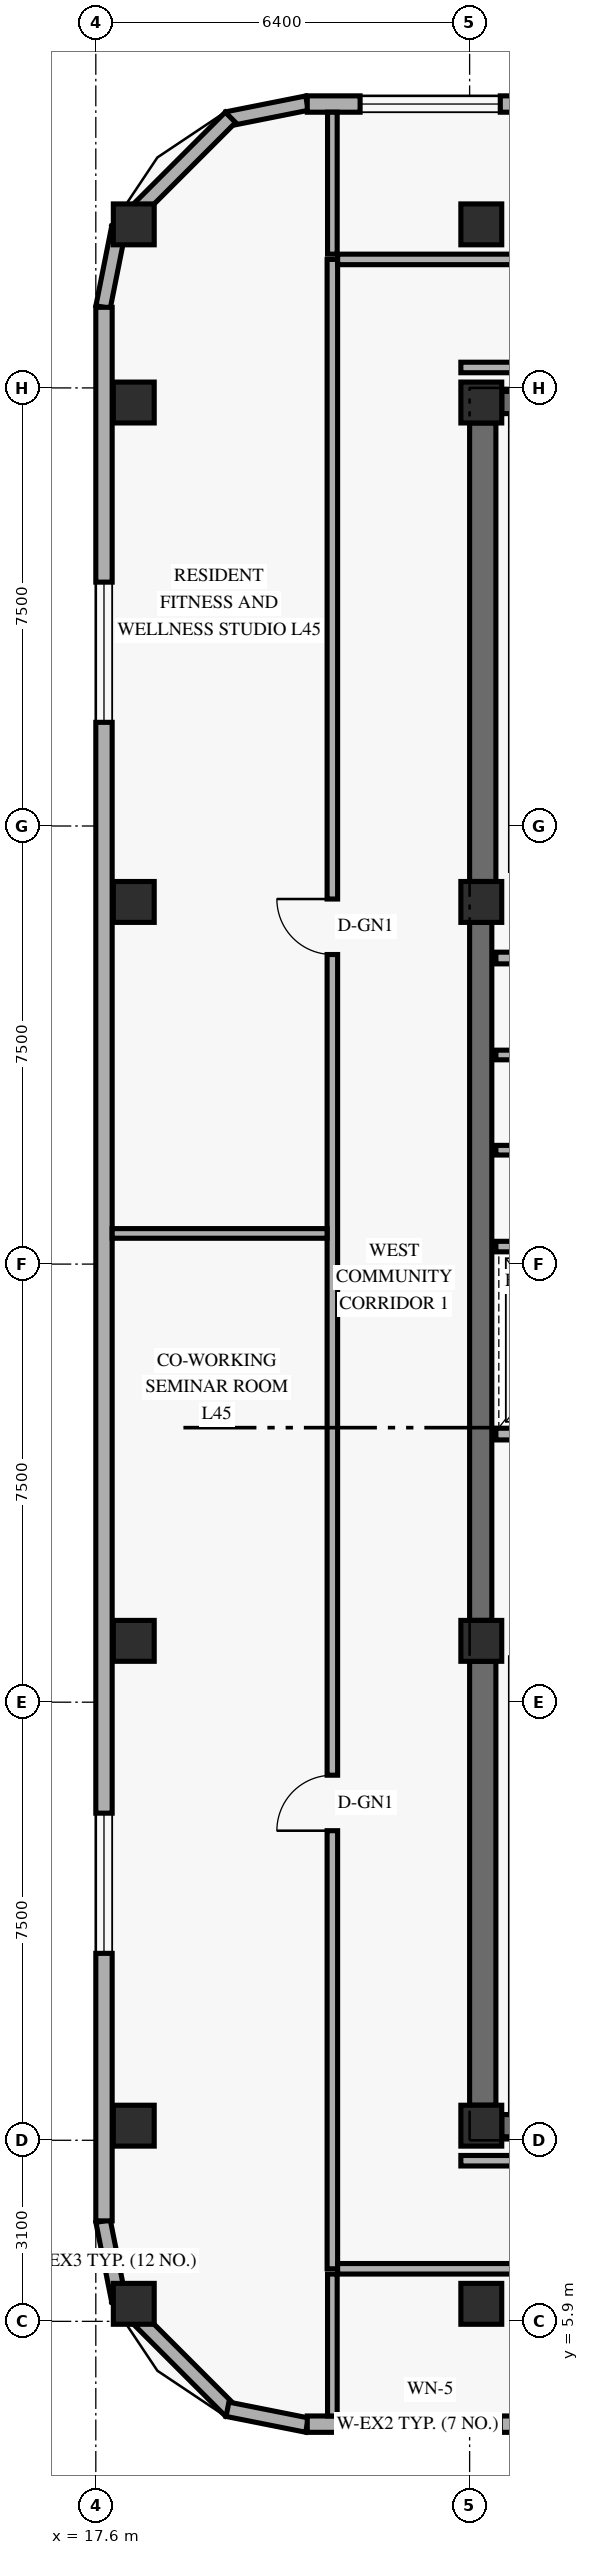
"""IFC4 building model, lengths in metres.
Left out: names, types, materials, properties, quantities, classifications, styles, units other than length and angle.
Written with IfcOpenShell. Run it as: python <this file> out.ifc"""

import sys

from ifc_helpers import new_model, si_unit, direction, frame, frame_2d, origin, origin_2d, place, context, subcontext, project, spatial, rectangle, extrude, element, fill, save


model = new_model("IFC4")
c1 = context("Model", 3, precision=1e-05, world=origin(), true_north=direction((0.0, 1.0)))
c2 = subcontext(c1, "Body", "Model", "MODEL_VIEW")
j1 = project(units=[si_unit("LENGTHUNIT", "METRE"), si_unit("PLANEANGLEUNIT", "RADIAN")], contexts=[c1])
p1 = place(None, origin())
s1 = spatial("IfcSite", under=j1, at=p1, CompositionType="ELEMENT")
p2 = place(p1, origin())
s2 = spatial("IfcBuilding", under=s1, at=p2, CompositionType="ELEMENT")
p3 = place(p2, frame((0.0, 0.0, 173.4)))
s3 = spatial("IfcBuildingStorey", under=s2, at=p3, CompositionType="ELEMENT", Elevation=173.4)
p4 = place(p3, frame((24.225, 9.6, 0.0), z_axis=(0.0, 0.0, 1.0), x_axis=(0.0, 1.0, 0.0)))
e1 = element("IfcWall", 1, at=p4, inside=s3, PredefinedType="SHEAR", context=c2, shape_type="SweptSolid", body=[
    extrude(rectangle(XDim=7.6, YDim=0.45, at=frame_2d((3.8, 0.0))), origin(), (0.0, 0.0, 1.0), 3.348),
])
p5 = place(p3, frame((24.19, 17.9, 0.0), z_axis=(0.0, 0.0, 1.0), x_axis=(0.0, 1.0, 0.0)))
e2 = element("IfcWall", 2, at=p5, inside=s3, PredefinedType="SHEAR", context=c2, shape_type="SweptSolid", body=[
    extrude(rectangle(XDim=11.95, YDim=0.38, at=frame_2d((5.975, 0.0))), origin(), (0.0, 0.0, 1.0), 3.348),
])
p6 = place(p3, frame((24.225, 30.55, 0.0), z_axis=(0.0, 0.0, 1.0), x_axis=(0.0, 1.0, 0.0)))
e3 = element("IfcWall", 3, at=p6, inside=s3, PredefinedType="SHEAR", context=c2, shape_type="SweptSolid", body=[
    extrude(rectangle(XDim=7.85, YDim=0.45, at=frame_2d((3.925, 0.0))), origin(), (0.0, 0.0, 1.0), 3.348),
])
for number, where, z_axis, x_axis in (
    (4, (24.55, 9.25, 0.0), (0.0, 0.0, 1.0), (1.0, 0.0, 0.0)),
    (5, (24.55, 38.75, 0.0), (0.0, 0.0, 1.0), (1.0, 0.0, 0.0)),
):
    element("IfcWall", number, at=place(p3, frame(where, z_axis=z_axis, x_axis=x_axis)), inside=s3, PredefinedType="SHEAR", context=c2, shape_type="SweptSolid", body=[
        extrude(rectangle(XDim=10.3, YDim=0.38, at=frame_2d((5.15, 0.0))), origin(), (0.0, 0.0, 1.0), 3.96),
    ])
for number, where, z_axis, x_axis in (
    (6, (18.25, 6.2, 0.0), (0.0, 0.0, 1.0), (1.0, 0.0, 0.0)),
    (7, (18.25, 9.25, 0.0), (0.0, 0.0, 1.0), (1.0, 0.0, 0.0)),
    (8, (18.25, 17.55, 0.0), (0.0, 0.0, 1.0), (1.0, 0.0, 0.0)),
    (9, (18.25, 30.2, 0.0), (0.0, 0.0, 1.0), (1.0, 0.0, 0.0)),
    (10, (18.25, 38.75, 0.0), (0.0, 0.0, 1.0), (1.0, 0.0, 0.0)),
    (11, (18.25, 41.8, 0.0), (0.0, 0.0, 1.0), (1.0, 0.0, 0.0)),
    (12, (24.2, 6.2, 0.0), (0.0, 0.0, 1.0), (1.0, 0.0, 0.0)),
    (13, (24.2, 9.25, 0.0), (0.0, 0.0, 1.0), (1.0, 0.0, 0.0)),
    (14, (24.2, 17.55, 0.0), (0.0, 0.0, 1.0), (1.0, 0.0, 0.0)),
    (15, (24.2, 30.2, 0.0), (0.0, 0.0, 1.0), (1.0, 0.0, 0.0)),
    (16, (24.2, 38.75, 0.0), (0.0, 0.0, 1.0), (1.0, 0.0, 0.0)),
    (17, (24.2, 41.8, 0.0), (0.0, 0.0, 1.0), (1.0, 0.0, 0.0)),
):
    element("IfcColumn", number, at=place(p3, frame(where, z_axis=z_axis, x_axis=x_axis)), inside=s3, PredefinedType="COLUMN", context=c2, shape_type="SweptSolid", body=[
        extrude(rectangle(XDim=0.7, YDim=0.7, at=origin_2d()), origin(), (0.0, 0.0, 1.0), 4.2),
    ])
p7 = place(p3, frame((17.724, 7.616, 0.0), z_axis=(0.0, 0.0, 1.0), x_axis=(0.195135625965, -0.9807762678, 0.0)))
e18 = element("IfcWall", 18, at=p7, inside=s3, PredefinedType="SOLIDWALL", context=c2, shape_type="SweptSolid", body=[
    extrude(rectangle(XDim=1.389, YDim=0.25, at=frame_2d((0.694, 0.0))), origin(), (0.0, 0.0, 1.0), 3.96),
])
p8 = place(p3, frame((17.968, 6.305, 0.0), z_axis=(0.0, 0.0, 1.0), x_axis=(0.707106781187, -0.707106781187, 0.0)))
e19 = element("IfcWall", 19, at=p8, inside=s3, PredefinedType="SOLIDWALL", context=c2, shape_type="SweptSolid", body=[
    extrude(rectangle(XDim=2.739, YDim=0.25, at=frame_2d((1.37, 0.0))), origin(), (0.0, 0.0, 1.0), 3.96),
])
for number, where, z_axis, x_axis in (
    (20, (19.854, 4.395, 0.0), (0.0, 0.0, 1.0), (0.981, -0.195, 0.0)),
    (21, (21.217, 43.876, 0.0), (0.0, 0.0, 1.0), (-0.981, -0.195, 0.0)),
):
    element("IfcWall", number, at=place(p3, frame(where, z_axis=z_axis, x_axis=x_axis)), inside=s3, PredefinedType="SOLIDWALL", context=c2, shape_type="SweptSolid", body=[
        extrude(rectangle(XDim=1.389, YDim=0.25, at=frame_2d((0.694, 0.0))), origin(), (0.0, 0.0, 1.0), 3.96),
    ])
p9 = place(p3, frame((19.905, 43.632, 0.0), z_axis=(0.0, 0.0, 1.0), x_axis=(-0.707106781187, -0.707106781187, 0.0)))
e22 = element("IfcWall", 22, at=p9, inside=s3, PredefinedType="SOLIDWALL", context=c2, shape_type="SweptSolid", body=[
    extrude(rectangle(XDim=2.739, YDim=0.25, at=frame_2d((1.37, 0.0))), origin(), (0.0, 0.0, 1.0), 3.96),
])
p10 = place(p3, frame((17.995, 41.746, 0.0), z_axis=(0.0, 0.0, 1.0), x_axis=(-0.195135625965, -0.9807762678, 0.0)))
e23 = element("IfcWall", 23, at=p10, inside=s3, PredefinedType="SOLIDWALL", context=c2, shape_type="SweptSolid", body=[
    extrude(rectangle(XDim=1.389, YDim=0.25, at=frame_2d((0.694, 0.0))), origin(), (0.0, 0.0, 1.0), 3.96),
])
p11 = place(p3, frame((21.22, 4.14, 0.0), z_axis=(0.0, 0.0, 1.0), x_axis=(1.0, 0.0, 0.0)))
e24 = element("IfcWall", 24, at=p11, inside=s3, PredefinedType="SOLIDWALL", context=c2, shape_type="SweptSolid", body=[
    extrude(rectangle(XDim=3.78, YDim=0.28, at=frame_2d((1.89, 0.0))), origin(), (0.0, 0.0, 1.0), 3.96),
])
p12 = place(p11, frame((0.905, 0.0, 0.85)))
e25 = element("IfcOpeningElement", 25, at=p12, cuts=e24, PredefinedType="OPENING", context=c2, shape_type="SweptSolid", body=[
    extrude(rectangle(XDim=2.4, YDim=1.9, at=frame_2d((1.2, 0.95))), frame((0.0, 0.15, 0.0), z_axis=(0.0, -1.0, 0.0), x_axis=(1.0, 0.0, 0.0)), (0.0, 0.0, 1.0), 0.3),
])
p13 = place(p3, frame((25.0, 43.86, 0.0), z_axis=(0.0, 0.0, 1.0), x_axis=(-1.0, 0.0, 0.0)))
e26 = element("IfcWall", 26, at=p13, inside=s3, PredefinedType="SOLIDWALL", context=c2, shape_type="SweptSolid", body=[
    extrude(rectangle(XDim=3.78, YDim=0.28, at=frame_2d((1.89, 0.0))), origin(), (0.0, 0.0, 1.0), 3.96),
])
p14 = place(p13, frame((0.475, 0.0, 0.85)))
e27 = element("IfcOpeningElement", 27, at=p14, cuts=e26, PredefinedType="OPENING", context=c2, shape_type="SweptSolid", body=[
    extrude(rectangle(XDim=2.4, YDim=1.9, at=frame_2d((1.2, 0.95))), frame((0.0, 0.15, 0.0), z_axis=(0.0, -1.0, 0.0), x_axis=(1.0, 0.0, 0.0)), (0.0, 0.0, 1.0), 0.3),
])
p15 = place(p3, frame((17.74, 40.38, 0.0), z_axis=(0.0, 0.0, 1.0), x_axis=(0.0, -1.0, 0.0)))
e28 = element("IfcWall", 28, at=p15, inside=s3, PredefinedType="SOLIDWALL", context=c2, shape_type="SweptSolid", body=[
    extrude(rectangle(XDim=32.76, YDim=0.28, at=frame_2d((16.38, 0.0))), origin(), (0.0, 0.0, 1.0), 3.96),
])
p16 = place(p15, frame((25.78, 0.0, 0.85)))
e29 = element("IfcOpeningElement", 29, at=p16, cuts=e28, PredefinedType="OPENING", context=c2, shape_type="SweptSolid", body=[
    extrude(rectangle(XDim=2.4, YDim=1.9, at=frame_2d((1.2, 0.95))), frame((0.0, 0.15, 0.0), z_axis=(0.0, -1.0, 0.0), x_axis=(1.0, 0.0, 0.0)), (0.0, 0.0, 1.0), 0.3),
])
p17 = place(p15, frame((4.705, 0.0, 0.85)))
e30 = element("IfcOpeningElement", 30, at=p17, cuts=e28, PredefinedType="OPENING", context=c2, shape_type="SweptSolid", body=[
    extrude(rectangle(XDim=2.4, YDim=1.9, at=frame_2d((1.2, 0.95))), frame((0.0, 0.15, 0.0), z_axis=(0.0, -1.0, 0.0), x_axis=(1.0, 0.0, 0.0)), (0.0, 0.0, 1.0), 0.3),
])
p18 = place(p3, frame((24.45, 21.09, 0.0), z_axis=(0.0, 0.0, 1.0), x_axis=(1.0, 0.0, 0.0)))
e31 = element("IfcWall", 31, at=p18, inside=s3, PredefinedType="STANDARD", context=c2, shape_type="SweptSolid", body=[
    extrude(rectangle(XDim=6.83, YDim=0.2, at=frame_2d((3.415, 0.0))), origin(), (0.0, 0.0, 1.0), 3.96),
])
p19 = place(p18, frame((0.72, 0.0, 0.0)))
e32 = element("IfcOpeningElement", 32, at=p19, cuts=e31, PredefinedType="OPENING", context=c2, shape_type="SweptSolid", body=[
    extrude(rectangle(XDim=1.1, YDim=2.2, at=frame_2d((0.55, 1.1))), frame((0.0, 0.11, 0.0), z_axis=(0.0, -1.0, 0.0), x_axis=(1.0, 0.0, 0.0)), (0.0, 0.0, 1.0), 0.22),
])
p20 = place(p18, frame((3.32, 0.0, 0.0)))
e33 = element("IfcOpeningElement", 33, at=p20, cuts=e31, PredefinedType="OPENING", context=c2, shape_type="SweptSolid", body=[
    extrude(rectangle(XDim=1.1, YDim=2.2, at=frame_2d((0.55, 1.1))), frame((0.0, 0.11, 0.0), z_axis=(0.0, -1.0, 0.0), x_axis=(1.0, 0.0, 0.0)), (0.0, 0.0, 1.0), 0.22),
])
p21 = place(p3, frame((24.45, 24.3, 0.0), z_axis=(0.0, 0.0, 1.0), x_axis=(1.0, 0.0, 0.0)))
e34 = element("IfcWall", 34, at=p21, inside=s3, PredefinedType="STANDARD", context=c2, shape_type="SweptSolid", body=[
    extrude(rectangle(XDim=6.83, YDim=0.18, at=frame_2d((3.415, 0.0))), origin(), (0.0, 0.0, 1.0), 3.96),
])
p22 = place(p3, frame((24.45, 29.24, 0.0), z_axis=(0.0, 0.0, 1.0), x_axis=(1.0, 0.0, 0.0)))
e35 = element("IfcWall", 35, at=p22, inside=s3, PredefinedType="STANDARD", context=c2, shape_type="SweptSolid", body=[
    extrude(rectangle(XDim=3.65, YDim=0.2, at=frame_2d((1.825, 0.0))), origin(), (0.0, 0.0, 1.0), 3.96),
])
for number, where, z_axis, x_axis in (
    (36, (24.45, 25.95, 0.0), (0.0, 0.0, 1.0), (1.0, 0.0, 0.0)),
    (37, (24.45, 27.58, 0.0), (0.0, 0.0, 1.0), (1.0, 0.0, 0.0)),
):
    element("IfcWall", number, at=place(p3, frame(where, z_axis=z_axis, x_axis=x_axis)), inside=s3, PredefinedType="PARTITIONING", context=c2, shape_type="SweptSolid", body=[
        extrude(rectangle(XDim=3.55, YDim=0.165, at=frame_2d((1.775, 0.0))), origin(), (0.0, 0.0, 1.0), 3.96),
    ])
p23 = place(p3, frame((21.65, 6.8, 0.0), z_axis=(0.0, 0.0, 1.0), x_axis=(0.0, 1.0, 0.0)))
e38 = element("IfcWall", 38, at=p23, inside=s3, PredefinedType="STANDARD", context=c2, shape_type="SweptSolid", body=[
    extrude(rectangle(XDim=34.4, YDim=0.18, at=frame_2d((17.2, 0.0))), origin(), (0.0, 0.0, 1.0), 3.33),
])
p24 = place(p23, frame((7.5, 0.0, 0.0)))
e39 = element("IfcOpeningElement", 39, at=p24, cuts=e38, PredefinedType="OPENING", context=c2, shape_type="SweptSolid", body=[
    extrude(rectangle(XDim=0.95, YDim=2.15, at=frame_2d((0.475, 1.075))), frame((0.0, 0.1, 0.0), z_axis=(0.0, -1.0, 0.0), x_axis=(1.0, 0.0, 0.0)), (0.0, 0.0, 1.0), 0.2),
])
p25 = place(p23, frame((22.5, 0.0, 0.0)))
e40 = element("IfcOpeningElement", 40, at=p25, cuts=e38, PredefinedType="OPENING", context=c2, shape_type="SweptSolid", body=[
    extrude(rectangle(XDim=0.95, YDim=2.15, at=frame_2d((0.475, 1.075))), frame((0.0, 0.1, 0.0), z_axis=(0.0, -1.0, 0.0), x_axis=(1.0, 0.0, 0.0)), (0.0, 0.0, 1.0), 0.2),
])
p26 = place(p3, frame((21.74, 6.8, 0.0), z_axis=(0.0, 0.0, 1.0), x_axis=(1.0, 0.0, 0.0)))
e41 = element("IfcWall", 41, at=p26, inside=s3, PredefinedType="STANDARD", context=c2, shape_type="SweptSolid", body=[
    extrude(rectangle(XDim=15.57, YDim=0.18, at=frame_2d((7.785, 0.0))), origin(), (0.0, 0.0, 1.0), 3.33),
])
p27 = place(p26, frame((5.41, 0.0, 0.0)))
e42 = element("IfcOpeningElement", 42, at=p27, cuts=e41, PredefinedType="OPENING", context=c2, shape_type="SweptSolid", body=[
    extrude(rectangle(XDim=0.95, YDim=2.15, at=frame_2d((0.475, 1.075))), frame((0.0, 0.1, 0.0), z_axis=(0.0, -1.0, 0.0), x_axis=(1.0, 0.0, 0.0)), (0.0, 0.0, 1.0), 0.2),
])
p28 = place(p3, frame((23.85, 8.65, 0.0), z_axis=(0.0, 0.0, 1.0), x_axis=(1.0, 0.0, 0.0)))
e43 = element("IfcWall", 43, at=p28, inside=s3, PredefinedType="STANDARD", context=c2, shape_type="SweptSolid", body=[
    extrude(rectangle(XDim=11.48, YDim=0.18, at=frame_2d((5.74, 0.0))), origin(), (0.0, 0.0, 1.0), 3.33),
])
p29 = place(p3, frame((21.74, 41.2, 0.0), z_axis=(0.0, 0.0, 1.0), x_axis=(1.0, 0.0, 0.0)))
e44 = element("IfcWall", 44, at=p29, inside=s3, PredefinedType="STANDARD", context=c2, shape_type="SweptSolid", body=[
    extrude(rectangle(XDim=15.57, YDim=0.18, at=frame_2d((7.785, 0.0))), origin(), (0.0, 0.0, 1.0), 3.33),
])
p30 = place(p29, frame((5.41, 0.0, 0.0)))
e45 = element("IfcOpeningElement", 45, at=p30, cuts=e44, PredefinedType="OPENING", context=c2, shape_type="SweptSolid", body=[
    extrude(rectangle(XDim=0.95, YDim=2.15, at=frame_2d((0.475, 1.075))), frame((0.0, 0.1, 0.0), z_axis=(0.0, -1.0, 0.0), x_axis=(1.0, 0.0, 0.0)), (0.0, 0.0, 1.0), 0.2),
])
p31 = place(p3, frame((23.85, 39.35, 0.0), z_axis=(0.0, 0.0, 1.0), x_axis=(1.0, 0.0, 0.0)))
e46 = element("IfcWall", 46, at=p31, inside=s3, PredefinedType="STANDARD", context=c2, shape_type="SweptSolid", body=[
    extrude(rectangle(XDim=11.48, YDim=0.18, at=frame_2d((5.74, 0.0))), origin(), (0.0, 0.0, 1.0), 3.33),
])
for number, where, z_axis, x_axis in (
    (47, (21.65, 4.28, 0.0), (0.0, 0.0, 1.0), (0.0, 1.0, 0.0)),
    (48, (21.65, 41.29, 0.0), (0.0, 0.0, 1.0), (0.0, 1.0, 0.0)),
):
    element("IfcWall", number, at=place(p3, frame(where, z_axis=z_axis, x_axis=x_axis)), inside=s3, PredefinedType="PARTITIONING", context=c2, shape_type="SweptSolid", body=[
        extrude(rectangle(XDim=2.43, YDim=0.165, at=frame_2d((1.215, 0.0))), origin(), (0.0, 0.0, 1.0), 3.479),
    ])
p32 = place(p3, frame((17.88, 24.525, 0.0), z_axis=(0.0, 0.0, 1.0), x_axis=(1.0, 0.0, 0.0)))
e49 = element("IfcWall", 49, at=p32, inside=s3, PredefinedType="PARTITIONING", context=c2, shape_type="SweptSolid", body=[
    extrude(rectangle(XDim=3.68, YDim=0.165, at=frame_2d((1.84, 0.0))), origin(), (0.0, 0.0, 1.0), 3.479),
])
p33 = place(p12, origin())
e50 = element("IfcWindow", 50, at=p33, inside=s3, PartitioningType="SINGLE_PANEL", PredefinedType="WINDOW", context=c2, shape_type="SweptSolid", body=[
    extrude(rectangle(XDim=2.4, YDim=1.9, at=frame_2d((1.2, 0.95))), frame((0.0, 0.03, 0.0), z_axis=(0.0, -1.0, 0.0), x_axis=(1.0, 0.0, 0.0)), (0.0, 0.0, 1.0), 0.06),
])
fill(e25, e50)
p34 = place(p14, origin())
e51 = element("IfcWindow", 51, at=p34, inside=s3, PartitioningType="SINGLE_PANEL", PredefinedType="WINDOW", context=c2, shape_type="SweptSolid", body=[
    extrude(rectangle(XDim=2.4, YDim=1.9, at=frame_2d((1.2, 0.95))), frame((0.0, 0.03, 0.0), z_axis=(0.0, -1.0, 0.0), x_axis=(1.0, 0.0, 0.0)), (0.0, 0.0, 1.0), 0.06),
])
fill(e27, e51)
p35 = place(p16, origin())
e52 = element("IfcWindow", 52, at=p35, inside=s3, PartitioningType="SINGLE_PANEL", PredefinedType="WINDOW", context=c2, shape_type="SweptSolid", body=[
    extrude(rectangle(XDim=2.4, YDim=1.9, at=frame_2d((1.2, 0.95))), frame((0.0, 0.03, 0.0), z_axis=(0.0, -1.0, 0.0), x_axis=(1.0, 0.0, 0.0)), (0.0, 0.0, 1.0), 0.06),
])
fill(e29, e52)
p36 = place(p17, origin())
e53 = element("IfcWindow", 53, at=p36, inside=s3, PartitioningType="SINGLE_PANEL", PredefinedType="WINDOW", context=c2, shape_type="SweptSolid", body=[
    extrude(rectangle(XDim=2.4, YDim=1.9, at=frame_2d((1.2, 0.95))), frame((0.0, 0.03, 0.0), z_axis=(0.0, -1.0, 0.0), x_axis=(1.0, 0.0, 0.0)), (0.0, 0.0, 1.0), 0.06),
])
fill(e30, e53)
p37 = place(p24, origin())
e54 = element("IfcDoor", 54, at=p37, inside=s3, OperationType="SINGLE_SWING_LEFT", PredefinedType="DOOR", context=c2, shape_type="SweptSolid", body=[
    extrude(rectangle(XDim=0.95, YDim=2.15, at=frame_2d((0.475, 1.075))), frame((0.0, 0.025, 0.0), z_axis=(0.0, -1.0, 0.0), x_axis=(1.0, 0.0, 0.0)), (0.0, 0.0, 1.0), 0.05),
])
fill(e39, e54)
p38 = place(p25, origin())
e55 = element("IfcDoor", 55, at=p38, inside=s3, OperationType="SINGLE_SWING_RIGHT", PredefinedType="DOOR", context=c2, shape_type="SweptSolid", body=[
    extrude(rectangle(XDim=0.95, YDim=2.15, at=frame_2d((0.475, 1.075))), frame((0.0, 0.025, 0.0), z_axis=(0.0, -1.0, 0.0), x_axis=(1.0, 0.0, 0.0)), (0.0, 0.0, 1.0), 0.05),
])
fill(e40, e55)
save(model, sys.argv[1])
